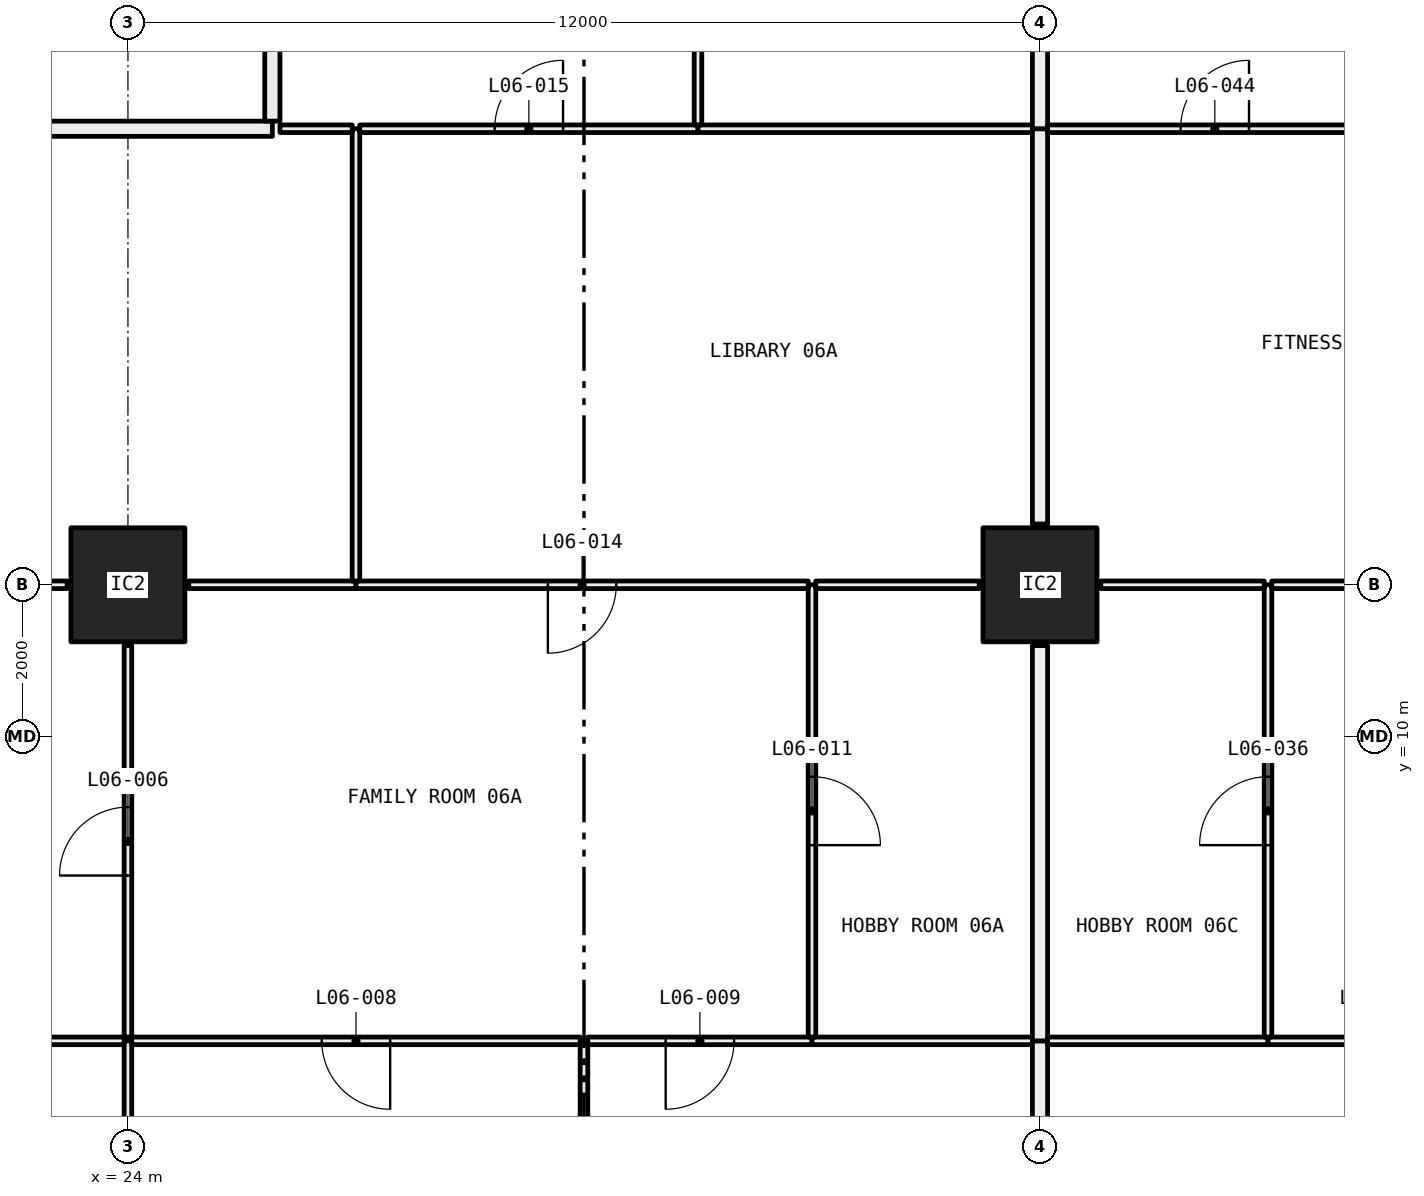
"""IFC4 building model, lengths in metres.
Left out: names, types, materials, properties, quantities, classifications, styles, units other than length and angle.
Written with IfcOpenShell. Run it as: python <this file> out.ifc"""

import sys

from ifc_helpers import new_model, si_unit, direction, frame, frame_2d, origin, origin_2d, place, context, subcontext, project, spatial, rectangle, hollow_rectangle, extrude, element, fill, save


model = new_model("IFC4")
c1 = context("Model", 3, precision=1e-05, world=origin(), true_north=direction((0.0, 1.0)))
c2 = subcontext(c1, "Body", "Model", "MODEL_VIEW")
j1 = project(units=[si_unit("LENGTHUNIT", "METRE"), si_unit("PLANEANGLEUNIT", "RADIAN")], contexts=[c1])
p1 = place(None, origin())
s1 = spatial("IfcSite", under=j1, at=p1, CompositionType="ELEMENT")
p2 = place(p1, origin())
s2 = spatial("IfcBuilding", under=s1, at=p2, CompositionType="ELEMENT")
p3 = place(p2, frame((0.0, 0.0, 33.45)))
s3 = spatial("IfcBuildingStorey", under=s2, at=p3, CompositionType="ELEMENT", Elevation=33.45)
for number, where, z_axis, x_axis in (
    (1, (24.0, 12.0, 0.0), (0.0, 0.0, 1.0), (1.0, 0.0, 0.0)),
    (2, (36.0, 12.0, 0.0), (0.0, 0.0, 1.0), (1.0, 0.0, 0.0)),
):
    element("IfcColumn", number, at=place(p3, frame(where, z_axis=z_axis, x_axis=x_axis)), inside=s3, PredefinedType="COLUMN", context=c2, shape_type="SweptSolid", body=[
        extrude(hollow_rectangle(XDim=1.5, YDim=1.5, WallThickness=0.065, at=origin_2d()), origin(), (0.0, 0.0, 1.0), 3.05),
    ])
p4 = place(p3, frame((24.0, 0.72, 0.0), z_axis=(0.0, 0.0, 1.0), x_axis=(0.0, 1.0, 0.0)))
e3 = element("IfcWall", 3, at=p4, inside=s3, PredefinedType="PARTITIONING", context=c2, shape_type="SweptSolid", body=[
    extrude(rectangle(XDim=5.28, YDim=0.1, at=frame_2d((2.64, 0.0))), origin(), (0.0, 0.0, 1.0), 2.45),
])
p5 = place(p3, frame((23.95, 6.0, 0.0), z_axis=(0.0, 0.0, 1.0), x_axis=(-1.0, 0.0, 0.0)))
e4 = element("IfcWall", 4, at=p5, inside=s3, PredefinedType="PARTITIONING", context=c2, shape_type="SweptSolid", body=[
    extrude(rectangle(XDim=5.9, YDim=0.1, at=frame_2d((2.95, 0.0))), origin(), (0.0, 0.0, 1.0), 2.45),
])
p6 = place(p5, frame((2.5, 0.0, 0.0)))
e5 = element("IfcOpeningElement", 5, at=p6, cuts=e4, PredefinedType="OPENING", context=c2, shape_type="SweptSolid", body=[
    extrude(rectangle(XDim=0.9, YDim=2.1, at=frame_2d((0.45, 1.05))), frame((0.0, 0.06, 0.0), z_axis=(0.0, -1.0, 0.0), x_axis=(1.0, 0.0, 0.0)), (0.0, 0.0, 1.0), 0.12),
])
p7 = place(p3, frame((30.0, 0.72, 0.0), z_axis=(0.0, 0.0, 1.0), x_axis=(0.0, 1.0, 0.0)))
e6 = element("IfcWall", 6, at=p7, inside=s3, PredefinedType="PARTITIONING", context=c2, shape_type="SweptSolid", body=[
    extrude(rectangle(XDim=5.28, YDim=0.1, at=frame_2d((2.64, 0.0))), origin(), (0.0, 0.0, 1.0), 3.05),
])
p8 = place(p3, frame((29.95, 6.0, 0.0), z_axis=(0.0, 0.0, 1.0), x_axis=(-1.0, 0.0, 0.0)))
e7 = element("IfcWall", 7, at=p8, inside=s3, PredefinedType="PARTITIONING", context=c2, shape_type="SweptSolid", body=[
    extrude(rectangle(XDim=5.9, YDim=0.1, at=frame_2d((2.95, 0.0))), origin(), (0.0, 0.0, 1.0), 2.45),
])
p9 = place(p8, frame((2.5, 0.0, 0.0)))
e8 = element("IfcOpeningElement", 8, at=p9, cuts=e7, PredefinedType="OPENING", context=c2, shape_type="SweptSolid", body=[
    extrude(rectangle(XDim=0.9, YDim=2.1, at=frame_2d((0.45, 1.05))), frame((0.0, 0.06, 0.0), z_axis=(0.0, -1.0, 0.0), x_axis=(1.0, 0.0, 0.0)), (0.0, 0.0, 1.0), 0.12),
])
p10 = place(p3, frame((33.0, 6.0, 0.0), z_axis=(0.0, 0.0, 1.0), x_axis=(-1.0, 0.0, 0.0)))
e9 = element("IfcWall", 9, at=p10, inside=s3, PredefinedType="PARTITIONING", context=c2, shape_type="SweptSolid", body=[
    extrude(rectangle(XDim=2.95, YDim=0.1, at=frame_2d((1.475, 0.0))), origin(), (0.0, 0.0, 1.0), 3.05),
])
p11 = place(p10, frame((1.025, 0.0, 0.0)))
e10 = element("IfcOpeningElement", 10, at=p11, cuts=e9, PredefinedType="OPENING", context=c2, shape_type="SweptSolid", body=[
    extrude(rectangle(XDim=0.9, YDim=2.1, at=frame_2d((0.45, 1.05))), frame((0.0, 0.06, 0.0), z_axis=(0.0, -1.0, 0.0), x_axis=(1.0, 0.0, 0.0)), (0.0, 0.0, 1.0), 0.12),
])
p12 = place(p3, frame((35.9, 6.0, 0.0), z_axis=(0.0, 0.0, 1.0), x_axis=(-1.0, 0.0, 0.0)))
e11 = element("IfcWall", 11, at=p12, inside=s3, PredefinedType="PARTITIONING", context=c2, shape_type="SweptSolid", body=[
    extrude(rectangle(XDim=2.9, YDim=0.1, at=frame_2d((1.45, 0.0))), origin(), (0.0, 0.0, 1.0), 3.05),
])
p13 = place(p3, frame((36.0, 0.72, 0.0), z_axis=(0.0, 0.0, 1.0), x_axis=(0.0, 1.0, 0.0)))
e12 = element("IfcWall", 12, at=p13, inside=s3, PredefinedType="PARTITIONING", context=c2, shape_type="SweptSolid", body=[
    extrude(rectangle(XDim=5.28, YDim=0.2, at=frame_2d((2.64, 0.0))), origin(), (0.0, 0.0, 1.0), 2.45),
])
p14 = place(p3, frame((24.0, 6.05, 0.0), z_axis=(0.0, 0.0, 1.0), x_axis=(0.0, 1.0, 0.0)))
e13 = element("IfcWall", 13, at=p14, inside=s3, PredefinedType="PARTITIONING", context=c2, shape_type="SweptSolid", body=[
    extrude(rectangle(XDim=5.15, YDim=0.1, at=frame_2d((2.575, 0.0))), origin(), (0.0, 0.0, 1.0), 2.45),
])
p15 = place(p14, frame((2.125, 0.0, 0.0)))
e14 = element("IfcOpeningElement", 14, at=p15, cuts=e13, PredefinedType="OPENING", context=c2, shape_type="SweptSolid", body=[
    extrude(rectangle(XDim=0.9, YDim=2.1, at=frame_2d((0.45, 1.05))), frame((0.0, 0.06, 0.0), z_axis=(0.0, -1.0, 0.0), x_axis=(1.0, 0.0, 0.0)), (0.0, 0.0, 1.0), 0.12),
])
p16 = place(p3, frame((23.2, 12.0, 0.0), z_axis=(0.0, 0.0, 1.0), x_axis=(-1.0, 0.0, 0.0)))
e15 = element("IfcWall", 15, at=p16, inside=s3, PredefinedType="PARTITIONING", context=c2, shape_type="SweptSolid", body=[
    extrude(rectangle(XDim=5.2, YDim=0.1, at=frame_2d((2.6, 0.0))), origin(), (0.0, 0.0, 1.0), 2.45),
])
p17 = place(p3, frame((33.0, 6.05, 0.0), z_axis=(0.0, 0.0, 1.0), x_axis=(0.0, 1.0, 0.0)))
e16 = element("IfcWall", 16, at=p17, inside=s3, PredefinedType="PARTITIONING", context=c2, shape_type="SweptSolid", body=[
    extrude(rectangle(XDim=5.95, YDim=0.1, at=frame_2d((2.975, 0.0))), origin(), (0.0, 0.0, 1.0), 2.45),
])
p18 = place(p17, frame((2.525, 0.0, 0.0)))
e17 = element("IfcOpeningElement", 17, at=p18, cuts=e16, PredefinedType="OPENING", context=c2, shape_type="SweptSolid", body=[
    extrude(rectangle(XDim=0.9, YDim=2.1, at=frame_2d((0.45, 1.05))), frame((0.0, 0.06, 0.0), z_axis=(0.0, -1.0, 0.0), x_axis=(1.0, 0.0, 0.0)), (0.0, 0.0, 1.0), 0.12),
])
p19 = place(p3, frame((27.0, 12.0, 0.0), z_axis=(0.0, 0.0, 1.0), x_axis=(-1.0, 0.0, 0.0)))
e18 = element("IfcWall", 18, at=p19, inside=s3, PredefinedType="PARTITIONING", context=c2, shape_type="SweptSolid", body=[
    extrude(rectangle(XDim=2.2, YDim=0.1, at=frame_2d((1.1, 0.0))), origin(), (0.0, 0.0, 1.0), 2.45),
])
p20 = place(p3, frame((32.95, 12.0, 0.0), z_axis=(0.0, 0.0, 1.0), x_axis=(-1.0, 0.0, 0.0)))
e19 = element("IfcWall", 19, at=p20, inside=s3, PredefinedType="PARTITIONING", context=c2, shape_type="SweptSolid", body=[
    extrude(rectangle(XDim=5.95, YDim=0.1, at=frame_2d((2.975, 0.0))), origin(), (0.0, 0.0, 1.0), 2.45),
])
p21 = place(p20, frame((2.525, 0.0, 0.0)))
e20 = element("IfcOpeningElement", 20, at=p21, cuts=e19, PredefinedType="OPENING", context=c2, shape_type="SweptSolid", body=[
    extrude(rectangle(XDim=0.9, YDim=2.1, at=frame_2d((0.45, 1.05))), frame((0.0, 0.06, 0.0), z_axis=(0.0, -1.0, 0.0), x_axis=(1.0, 0.0, 0.0)), (0.0, 0.0, 1.0), 0.12),
])
p22 = place(p3, frame((35.2, 12.0, 0.0), z_axis=(0.0, 0.0, 1.0), x_axis=(-1.0, 0.0, 0.0)))
e21 = element("IfcWall", 21, at=p22, inside=s3, PredefinedType="PARTITIONING", context=c2, shape_type="SweptSolid", body=[
    extrude(rectangle(XDim=2.15, YDim=0.1, at=frame_2d((1.075, 0.0))), origin(), (0.0, 0.0, 1.0), 2.45),
])
p23 = place(p3, frame((36.0, 6.0, 0.0), z_axis=(0.0, 0.0, 1.0), x_axis=(0.0, 1.0, 0.0)))
e22 = element("IfcWall", 22, at=p23, inside=s3, PredefinedType="PARTITIONING", context=c2, shape_type="SweptSolid", body=[
    extrude(rectangle(XDim=5.2, YDim=0.2, at=frame_2d((2.6, 0.0))), origin(), (0.0, 0.0, 1.0), 2.45),
])
p24 = place(p3, frame((27.0, 12.05, 0.0), z_axis=(0.0, 0.0, 1.0), x_axis=(0.0, 1.0, 0.0)))
e23 = element("IfcWall", 23, at=p24, inside=s3, PredefinedType="PARTITIONING", context=c2, shape_type="SweptSolid", body=[
    extrude(rectangle(XDim=5.95, YDim=0.1, at=frame_2d((2.975, 0.0))), origin(), (0.0, 0.0, 1.0), 2.45),
])
p25 = place(p3, frame((26.95, 18.0, 0.0), z_axis=(0.0, 0.0, 1.0), x_axis=(-1.0, 0.0, 0.0)))
e24 = element("IfcWall", 24, at=p25, inside=s3, PredefinedType="PARTITIONING", context=c2, shape_type="SweptSolid", body=[
    extrude(rectangle(XDim=0.95, YDim=0.1, at=frame_2d((0.475, 0.0))), origin(), (0.0, 0.0, 1.0), 3.05),
])
p26 = place(p3, frame((25.9, 18.0, 0.0), z_axis=(0.0, 0.0, 1.0), x_axis=(-1.0, 0.0, 0.0)))
e25 = element("IfcWall", 25, at=p26, inside=s3, PredefinedType="PARTITIONING", context=c2, shape_type="SweptSolid", body=[
    extrude(rectangle(XDim=7.9, YDim=0.2, at=frame_2d((3.95, 0.0))), origin(), (0.0, 0.0, 1.0), 3.05),
])
p27 = place(p3, frame((31.5, 18.0, 0.0), z_axis=(0.0, 0.0, 1.0), x_axis=(-1.0, 0.0, 0.0)))
e26 = element("IfcWall", 26, at=p27, inside=s3, PredefinedType="PARTITIONING", context=c2, shape_type="SweptSolid", body=[
    extrude(rectangle(XDim=4.45, YDim=0.1, at=frame_2d((2.225, 0.0))), origin(), (0.0, 0.0, 1.0), 3.05),
])
p28 = place(p27, frame((1.775, 0.0, 0.0)))
e27 = element("IfcOpeningElement", 27, at=p28, cuts=e26, PredefinedType="OPENING", context=c2, shape_type="SweptSolid", body=[
    extrude(rectangle(XDim=0.9, YDim=2.1, at=frame_2d((0.45, 1.05))), frame((0.0, 0.06, 0.0), z_axis=(0.0, -1.0, 0.0), x_axis=(1.0, 0.0, 0.0)), (0.0, 0.0, 1.0), 0.12),
])
p29 = place(p3, frame((35.9, 18.0, 0.0), z_axis=(0.0, 0.0, 1.0), x_axis=(-1.0, 0.0, 0.0)))
e28 = element("IfcWall", 28, at=p29, inside=s3, PredefinedType="PARTITIONING", context=c2, shape_type="SweptSolid", body=[
    extrude(rectangle(XDim=4.4, YDim=0.1, at=frame_2d((2.2, 0.0))), origin(), (0.0, 0.0, 1.0), 3.05),
])
p30 = place(p3, frame((36.0, 12.8, 0.0), z_axis=(0.0, 0.0, 1.0), x_axis=(0.0, 1.0, 0.0)))
e29 = element("IfcWall", 29, at=p30, inside=s3, PredefinedType="PARTITIONING", context=c2, shape_type="SweptSolid", body=[
    extrude(rectangle(XDim=5.2, YDim=0.2, at=frame_2d((2.6, 0.0))), origin(), (0.0, 0.0, 1.0), 2.45),
])
p31 = place(p3, frame((31.5, 18.05, 0.0), z_axis=(0.0, 0.0, 1.0), x_axis=(0.0, 1.0, 0.0)))
e30 = element("IfcWall", 30, at=p31, inside=s3, PredefinedType="PARTITIONING", context=c2, shape_type="SweptSolid", body=[
    extrude(rectangle(XDim=6.25, YDim=0.1, at=frame_2d((3.125, 0.0))), origin(), (0.0, 0.0, 1.0), 2.45),
])
p32 = place(p31, frame((2.675, 0.0, 0.0)))
e31 = element("IfcOpeningElement", 31, at=p32, cuts=e30, PredefinedType="OPENING", context=c2, shape_type="SweptSolid", body=[
    extrude(rectangle(XDim=0.9, YDim=2.1, at=frame_2d((0.45, 1.05))), frame((0.0, 0.06, 0.0), z_axis=(0.0, -1.0, 0.0), x_axis=(1.0, 0.0, 0.0)), (0.0, 0.0, 1.0), 0.12),
])
p33 = place(p3, frame((25.9, 23.9, 0.0), z_axis=(0.0, 0.0, 1.0), x_axis=(0.0, -1.0, 0.0)))
e32 = element("IfcWall", 32, at=p33, inside=s3, PredefinedType="PARTITIONING", context=c2, shape_type="SweptSolid", body=[
    extrude(rectangle(XDim=5.8, YDim=0.2, at=frame_2d((2.9, 0.0))), origin(), (0.0, 0.0, 1.0), 3.05),
])
p34 = place(p3, frame((36.0, 18.0, 0.0), z_axis=(0.0, 0.0, 1.0), x_axis=(0.0, 1.0, 0.0)))
e33 = element("IfcWall", 33, at=p34, inside=s3, PredefinedType="PARTITIONING", context=c2, shape_type="SweptSolid", body=[
    extrude(rectangle(XDim=5.2, YDim=0.2, at=frame_2d((2.6, 0.0))), origin(), (0.0, 0.0, 1.0), 2.45),
])
p35 = place(p3, frame((39.0, 6.0, 0.0), z_axis=(0.0, 0.0, 1.0), x_axis=(-1.0, 0.0, 0.0)))
e34 = element("IfcWall", 34, at=p35, inside=s3, PredefinedType="PARTITIONING", context=c2, shape_type="SweptSolid", body=[
    extrude(rectangle(XDim=2.9, YDim=0.1, at=frame_2d((1.45, 0.0))), origin(), (0.0, 0.0, 1.0), 3.05),
])
p36 = place(p3, frame((41.95, 6.0, 0.0), z_axis=(0.0, 0.0, 1.0), x_axis=(-1.0, 0.0, 0.0)))
e35 = element("IfcWall", 35, at=p36, inside=s3, PredefinedType="PARTITIONING", context=c2, shape_type="SweptSolid", body=[
    extrude(rectangle(XDim=2.95, YDim=0.1, at=frame_2d((1.475, 0.0))), origin(), (0.0, 0.0, 1.0), 3.05),
])
p37 = place(p36, frame((1.025, 0.0, 0.0)))
e36 = element("IfcOpeningElement", 36, at=p37, cuts=e35, PredefinedType="OPENING", context=c2, shape_type="SweptSolid", body=[
    extrude(rectangle(XDim=0.9, YDim=2.1, at=frame_2d((0.45, 1.05))), frame((0.0, 0.06, 0.0), z_axis=(0.0, -1.0, 0.0), x_axis=(1.0, 0.0, 0.0)), (0.0, 0.0, 1.0), 0.12),
])
p38 = place(p3, frame((39.0, 6.05, 0.0), z_axis=(0.0, 0.0, 1.0), x_axis=(0.0, 1.0, 0.0)))
e37 = element("IfcWall", 37, at=p38, inside=s3, PredefinedType="PARTITIONING", context=c2, shape_type="SweptSolid", body=[
    extrude(rectangle(XDim=5.95, YDim=0.1, at=frame_2d((2.975, 0.0))), origin(), (0.0, 0.0, 1.0), 2.45),
])
p39 = place(p38, frame((2.525, 0.0, 0.0)))
e38 = element("IfcOpeningElement", 38, at=p39, cuts=e37, PredefinedType="OPENING", context=c2, shape_type="SweptSolid", body=[
    extrude(rectangle(XDim=0.9, YDim=2.1, at=frame_2d((0.45, 1.05))), frame((0.0, 0.06, 0.0), z_axis=(0.0, -1.0, 0.0), x_axis=(1.0, 0.0, 0.0)), (0.0, 0.0, 1.0), 0.12),
])
p40 = place(p3, frame((38.95, 12.0, 0.0), z_axis=(0.0, 0.0, 1.0), x_axis=(-1.0, 0.0, 0.0)))
e39 = element("IfcWall", 39, at=p40, inside=s3, PredefinedType="PARTITIONING", context=c2, shape_type="SweptSolid", body=[
    extrude(rectangle(XDim=2.15, YDim=0.1, at=frame_2d((1.075, 0.0))), origin(), (0.0, 0.0, 1.0), 2.45),
])
p41 = place(p3, frame((43.5, 12.0, 0.0), z_axis=(0.0, 0.0, 1.0), x_axis=(-1.0, 0.0, 0.0)))
e40 = element("IfcWall", 40, at=p41, inside=s3, PredefinedType="PARTITIONING", context=c2, shape_type="SweptSolid", body=[
    extrude(rectangle(XDim=4.45, YDim=0.1, at=frame_2d((2.225, 0.0))), origin(), (0.0, 0.0, 1.0), 2.45),
])
p42 = place(p41, frame((1.775, 0.0, 0.0)))
e41 = element("IfcOpeningElement", 41, at=p42, cuts=e40, PredefinedType="OPENING", context=c2, shape_type="SweptSolid", body=[
    extrude(rectangle(XDim=0.9, YDim=2.1, at=frame_2d((0.45, 1.05))), frame((0.0, 0.06, 0.0), z_axis=(0.0, -1.0, 0.0), x_axis=(1.0, 0.0, 0.0)), (0.0, 0.0, 1.0), 0.12),
])
p43 = place(p3, frame((40.5, 18.0, 0.0), z_axis=(0.0, 0.0, 1.0), x_axis=(-1.0, 0.0, 0.0)))
e42 = element("IfcWall", 42, at=p43, inside=s3, PredefinedType="PARTITIONING", context=c2, shape_type="SweptSolid", body=[
    extrude(rectangle(XDim=4.4, YDim=0.1, at=frame_2d((2.2, 0.0))), origin(), (0.0, 0.0, 1.0), 3.05),
])
p44 = place(p43, frame((1.75, 0.0, 0.0)))
e43 = element("IfcOpeningElement", 43, at=p44, cuts=e42, PredefinedType="OPENING", context=c2, shape_type="SweptSolid", body=[
    extrude(rectangle(XDim=0.9, YDim=2.1, at=frame_2d((0.45, 1.05))), frame((0.0, 0.06, 0.0), z_axis=(0.0, -1.0, 0.0), x_axis=(1.0, 0.0, 0.0)), (0.0, 0.0, 1.0), 0.12),
])
p45 = place(p15, origin())
e44 = element("IfcDoor", 44, at=p45, inside=s3, OperationType="SINGLE_SWING_RIGHT", PredefinedType="DOOR", context=c2, shape_type="SweptSolid", body=[
    extrude(rectangle(XDim=0.9, YDim=2.1, at=frame_2d((0.45, 1.05))), frame((0.0, 0.025, 0.0), z_axis=(0.0, -1.0, 0.0), x_axis=(1.0, 0.0, 0.0)), (0.0, 0.0, 1.0), 0.05),
])
fill(e14, e44)
p46 = place(p9, origin())
e45 = element("IfcDoor", 45, at=p46, inside=s3, OperationType="SINGLE_SWING_RIGHT", PredefinedType="DOOR", context=c2, shape_type="SweptSolid", body=[
    extrude(rectangle(XDim=0.9, YDim=2.1, at=frame_2d((0.45, 1.05))), frame((0.0, 0.025, 0.0), z_axis=(0.0, -1.0, 0.0), x_axis=(1.0, 0.0, 0.0)), (0.0, 0.0, 1.0), 0.05),
])
fill(e8, e45)
p47 = place(p11, origin())
e46 = element("IfcDoor", 46, at=p47, inside=s3, OperationType="SINGLE_SWING_LEFT", PredefinedType="DOOR", context=c2, shape_type="SweptSolid", body=[
    extrude(rectangle(XDim=0.9, YDim=2.1, at=frame_2d((0.45, 1.05))), frame((0.0, 0.025, 0.0), z_axis=(0.0, -1.0, 0.0), x_axis=(1.0, 0.0, 0.0)), (0.0, 0.0, 1.0), 0.05),
])
fill(e10, e46)
p48 = place(p18, frame((0.9, 0.0, 0.0), x_axis=(-1.0, 0.0, 0.0)))
e47 = element("IfcDoor", 47, at=p48, inside=s3, OperationType="SINGLE_SWING_LEFT", PredefinedType="DOOR", context=c2, shape_type="SweptSolid", body=[
    extrude(rectangle(XDim=0.9, YDim=2.1, at=frame_2d((0.45, 1.05))), frame((0.0, 0.025, 0.0), z_axis=(0.0, -1.0, 0.0), x_axis=(1.0, 0.0, 0.0)), (0.0, 0.0, 1.0), 0.05),
])
fill(e17, e47)
p49 = place(p21, origin())
e48 = element("IfcDoor", 48, at=p49, inside=s3, OperationType="SINGLE_SWING_LEFT", PredefinedType="DOOR", context=c2, shape_type="SweptSolid", body=[
    extrude(rectangle(XDim=0.9, YDim=2.1, at=frame_2d((0.45, 1.05))), frame((0.0, 0.025, 0.0), z_axis=(0.0, -1.0, 0.0), x_axis=(1.0, 0.0, 0.0)), (0.0, 0.0, 1.0), 0.05),
])
fill(e20, e48)
p50 = place(p28, frame((0.9, 0.0, 0.0), x_axis=(-1.0, 0.0, 0.0)))
e49 = element("IfcDoor", 49, at=p50, inside=s3, OperationType="SINGLE_SWING_LEFT", PredefinedType="DOOR", context=c2, shape_type="SweptSolid", body=[
    extrude(rectangle(XDim=0.9, YDim=2.1, at=frame_2d((0.45, 1.05))), frame((0.0, 0.025, 0.0), z_axis=(0.0, -1.0, 0.0), x_axis=(1.0, 0.0, 0.0)), (0.0, 0.0, 1.0), 0.05),
])
fill(e27, e49)
p51 = place(p39, origin())
e50 = element("IfcDoor", 50, at=p51, inside=s3, OperationType="SINGLE_SWING_RIGHT", PredefinedType="DOOR", context=c2, shape_type="SweptSolid", body=[
    extrude(rectangle(XDim=0.9, YDim=2.1, at=frame_2d((0.45, 1.05))), frame((0.0, 0.025, 0.0), z_axis=(0.0, -1.0, 0.0), x_axis=(1.0, 0.0, 0.0)), (0.0, 0.0, 1.0), 0.05),
])
fill(e38, e50)
p52 = place(p44, frame((0.9, 0.0, 0.0), x_axis=(-1.0, 0.0, 0.0)))
e51 = element("IfcDoor", 51, at=p52, inside=s3, OperationType="SINGLE_SWING_LEFT", PredefinedType="DOOR", context=c2, shape_type="SweptSolid", body=[
    extrude(rectangle(XDim=0.9, YDim=2.1, at=frame_2d((0.45, 1.05))), frame((0.0, 0.025, 0.0), z_axis=(0.0, -1.0, 0.0), x_axis=(1.0, 0.0, 0.0)), (0.0, 0.0, 1.0), 0.05),
])
fill(e43, e51)
save(model, sys.argv[1])
